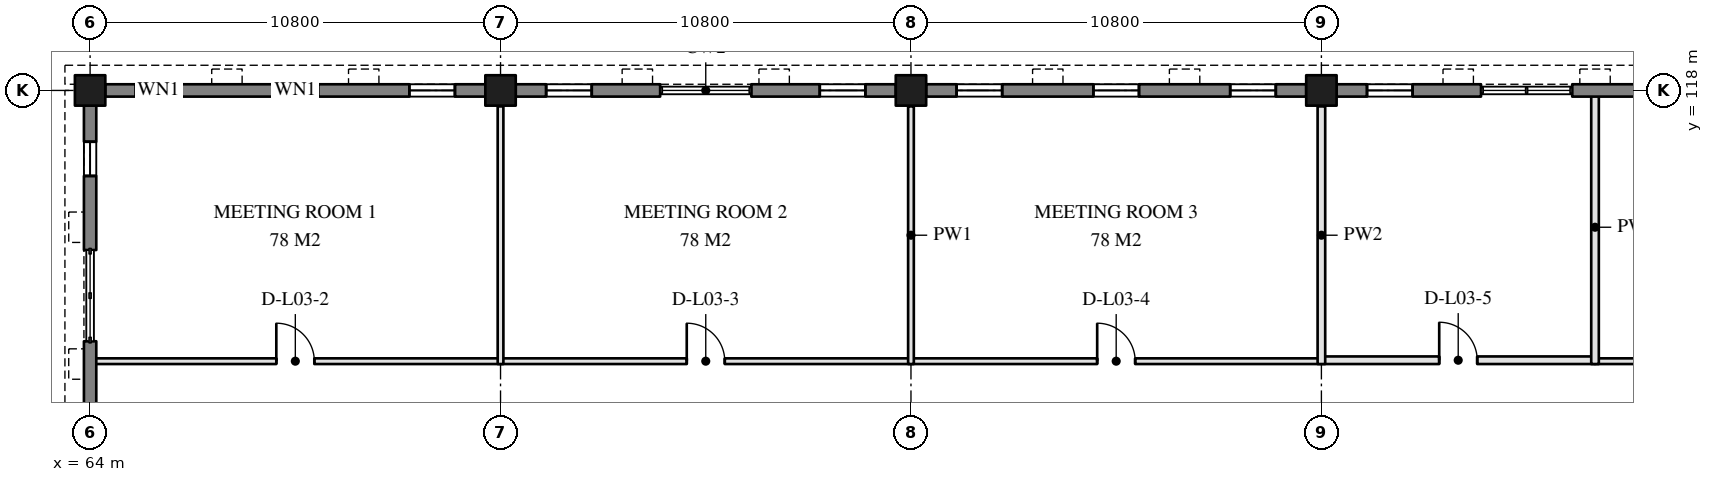
"""IFC4 building model, lengths in metres.
Left out: names, types, materials, properties, quantities, classifications, styles, units other than length and angle.
Written with IfcOpenShell. Run it as: python <this file> out.ifc"""

import sys

from ifc_helpers import new_model, si_unit, direction, frame, frame_2d, origin, origin_2d, place, context, subcontext, project, spatial, rectangle, extrude, element, fill, save


model = new_model("IFC4")
c1 = context("Model", 3, precision=1e-05, world=origin(), true_north=direction((0.0, 1.0)))
c2 = subcontext(c1, "Body", "Model", "MODEL_VIEW")
j1 = project(units=[si_unit("LENGTHUNIT", "METRE"), si_unit("PLANEANGLEUNIT", "RADIAN")], contexts=[c1])
p1 = place(None, origin())
s1 = spatial("IfcSite", under=j1, at=p1, CompositionType="ELEMENT")
p2 = place(p1, origin())
s2 = spatial("IfcBuilding", under=s1, at=p2, CompositionType="ELEMENT")
p3 = place(p2, frame((0.0, 0.0, 12.6)))
s3 = spatial("IfcBuildingStorey", under=s2, at=p3, CompositionType="ELEMENT", Elevation=12.6)
for number, where, z_axis, x_axis in (
    (1, (64.0, 118.0, 0.0), (0.0, 0.0, 1.0), (1.0, 0.0, 0.0)),
    (2, (74.8, 118.0, 0.0), (0.0, 0.0, 1.0), (1.0, 0.0, 0.0)),
    (3, (85.6, 118.0, 0.0), (0.0, 0.0, 1.0), (1.0, 0.0, 0.0)),
    (4, (96.4, 118.0, 0.0), (0.0, 0.0, 1.0), (1.0, 0.0, 0.0)),
):
    element("IfcColumn", number, at=place(p3, frame(where, z_axis=z_axis, x_axis=x_axis)), inside=s3, PredefinedType="COLUMN", context=c2, shape_type="SweptSolid", body=[
        extrude(rectangle(XDim=0.8, YDim=0.8, at=origin_2d()), origin(), (0.0, 0.0, 1.0), 3.9),
    ])
p4 = place(p3, frame((64.4, 118.0, 0.0), z_axis=(0.0, 0.0, 1.0), x_axis=(1.0, 0.0, 0.0)))
e5 = element("IfcWall", 5, at=p4, inside=s3, PredefinedType="SOLIDWALL", context=c2, shape_type="SweptSolid", body=[
    extrude(rectangle(XDim=10.0, YDim=0.325, at=frame_2d((5.0, 0.0))), origin(), (0.0, 0.0, 1.0), 2.8),
])
p5 = place(p4, frame((0.8, 0.0, 0.75)))
e6 = element("IfcOpeningElement", 6, at=p5, cuts=e5, PredefinedType="OPENING", context=c2, shape_type="SweptSolid", body=[
    extrude(rectangle(XDim=1.2, YDim=1.95, at=frame_2d((0.6, 0.975))), frame((0.0, 0.172, 0.0), z_axis=(0.0, -1.0, 0.0), x_axis=(1.0, 0.0, 0.0)), (0.0, 0.0, 1.0), 0.345),
])
p6 = place(p4, frame((4.4, 0.0, 0.75)))
e7 = element("IfcOpeningElement", 7, at=p6, cuts=e5, PredefinedType="OPENING", context=c2, shape_type="SweptSolid", body=[
    extrude(rectangle(XDim=1.2, YDim=1.95, at=frame_2d((0.6, 0.975))), frame((0.0, 0.172, 0.0), z_axis=(0.0, -1.0, 0.0), x_axis=(1.0, 0.0, 0.0)), (0.0, 0.0, 1.0), 0.345),
])
p7 = place(p4, frame((8.0, 0.0, 0.75)))
e8 = element("IfcOpeningElement", 8, at=p7, cuts=e5, PredefinedType="OPENING", context=c2, shape_type="SweptSolid", body=[
    extrude(rectangle(XDim=1.2, YDim=1.95, at=frame_2d((0.6, 0.975))), frame((0.0, 0.172, 0.0), z_axis=(0.0, -1.0, 0.0), x_axis=(1.0, 0.0, 0.0)), (0.0, 0.0, 1.0), 0.345),
])
p8 = place(p3, frame((75.2, 118.0, 0.0), z_axis=(0.0, 0.0, 1.0), x_axis=(1.0, 0.0, 0.0)))
e9 = element("IfcWall", 9, at=p8, inside=s3, PredefinedType="SOLIDWALL", context=c2, shape_type="SweptSolid", body=[
    extrude(rectangle(XDim=3.8, YDim=0.325, at=frame_2d((1.9, 0.0))), origin(), (0.0, 0.0, 1.0), 2.8),
])
p9 = place(p8, frame((0.8, 0.0, 0.75)))
e10 = element("IfcOpeningElement", 10, at=p9, cuts=e9, PredefinedType="OPENING", context=c2, shape_type="SweptSolid", body=[
    extrude(rectangle(XDim=1.2, YDim=1.95, at=frame_2d((0.6, 0.975))), frame((0.0, 0.172, 0.0), z_axis=(0.0, -1.0, 0.0), x_axis=(1.0, 0.0, 0.0)), (0.0, 0.0, 1.0), 0.345),
])
p10 = place(p3, frame((81.4, 118.0, 0.0), z_axis=(0.0, 0.0, 1.0), x_axis=(1.0, 0.0, 0.0)))
e11 = element("IfcWall", 11, at=p10, inside=s3, PredefinedType="SOLIDWALL", context=c2, shape_type="SweptSolid", body=[
    extrude(rectangle(XDim=3.8, YDim=0.325, at=frame_2d((1.9, 0.0))), origin(), (0.0, 0.0, 1.0), 2.8),
])
p11 = place(p10, frame((1.8, 0.0, 0.75)))
e12 = element("IfcOpeningElement", 12, at=p11, cuts=e11, PredefinedType="OPENING", context=c2, shape_type="SweptSolid", body=[
    extrude(rectangle(XDim=1.2, YDim=1.95, at=frame_2d((0.6, 0.975))), frame((0.0, 0.172, 0.0), z_axis=(0.0, -1.0, 0.0), x_axis=(1.0, 0.0, 0.0)), (0.0, 0.0, 1.0), 0.345),
])
p12 = place(p3, frame((86.0, 118.0, 0.0), z_axis=(0.0, 0.0, 1.0), x_axis=(1.0, 0.0, 0.0)))
e13 = element("IfcWall", 13, at=p12, inside=s3, PredefinedType="SOLIDWALL", context=c2, shape_type="SweptSolid", body=[
    extrude(rectangle(XDim=10.0, YDim=0.325, at=frame_2d((5.0, 0.0))), origin(), (0.0, 0.0, 1.0), 2.8),
])
p13 = place(p12, frame((0.8, 0.0, 0.75)))
e14 = element("IfcOpeningElement", 14, at=p13, cuts=e13, PredefinedType="OPENING", context=c2, shape_type="SweptSolid", body=[
    extrude(rectangle(XDim=1.2, YDim=1.95, at=frame_2d((0.6, 0.975))), frame((0.0, 0.172, 0.0), z_axis=(0.0, -1.0, 0.0), x_axis=(1.0, 0.0, 0.0)), (0.0, 0.0, 1.0), 0.345),
])
p14 = place(p12, frame((4.4, 0.0, 0.75)))
e15 = element("IfcOpeningElement", 15, at=p14, cuts=e13, PredefinedType="OPENING", context=c2, shape_type="SweptSolid", body=[
    extrude(rectangle(XDim=1.2, YDim=1.95, at=frame_2d((0.6, 0.975))), frame((0.0, 0.172, 0.0), z_axis=(0.0, -1.0, 0.0), x_axis=(1.0, 0.0, 0.0)), (0.0, 0.0, 1.0), 0.345),
])
p15 = place(p12, frame((8.0, 0.0, 0.75)))
e16 = element("IfcOpeningElement", 16, at=p15, cuts=e13, PredefinedType="OPENING", context=c2, shape_type="SweptSolid", body=[
    extrude(rectangle(XDim=1.2, YDim=1.95, at=frame_2d((0.6, 0.975))), frame((0.0, 0.172, 0.0), z_axis=(0.0, -1.0, 0.0), x_axis=(1.0, 0.0, 0.0)), (0.0, 0.0, 1.0), 0.345),
])
p16 = place(p3, frame((96.8, 118.0, 0.0), z_axis=(0.0, 0.0, 1.0), x_axis=(1.0, 0.0, 0.0)))
e17 = element("IfcWall", 17, at=p16, inside=s3, PredefinedType="SOLIDWALL", context=c2, shape_type="SweptSolid", body=[
    extrude(rectangle(XDim=3.8, YDim=0.325, at=frame_2d((1.9, 0.0))), origin(), (0.0, 0.0, 1.0), 2.8),
])
p17 = place(p16, frame((0.8, 0.0, 0.75)))
e18 = element("IfcOpeningElement", 18, at=p17, cuts=e17, PredefinedType="OPENING", context=c2, shape_type="SweptSolid", body=[
    extrude(rectangle(XDim=1.2, YDim=1.95, at=frame_2d((0.6, 0.975))), frame((0.0, 0.172, 0.0), z_axis=(0.0, -1.0, 0.0), x_axis=(1.0, 0.0, 0.0)), (0.0, 0.0, 1.0), 0.345),
])
p18 = place(p3, frame((103.0, 118.0, 0.0), z_axis=(0.0, 0.0, 1.0), x_axis=(1.0, 0.0, 0.0)))
e19 = element("IfcWall", 19, at=p18, inside=s3, PredefinedType="SOLIDWALL", context=c2, shape_type="SweptSolid", body=[
    extrude(rectangle(XDim=3.8, YDim=0.325, at=frame_2d((1.9, 0.0))), origin(), (0.0, 0.0, 1.0), 2.8),
])
p19 = place(p18, frame((1.8, 0.0, 0.75)))
e20 = element("IfcOpeningElement", 20, at=p19, cuts=e19, PredefinedType="OPENING", context=c2, shape_type="SweptSolid", body=[
    extrude(rectangle(XDim=1.2, YDim=1.95, at=frame_2d((0.6, 0.975))), frame((0.0, 0.172, 0.0), z_axis=(0.0, -1.0, 0.0), x_axis=(1.0, 0.0, 0.0)), (0.0, 0.0, 1.0), 0.345),
])
p20 = place(p3, frame((64.0, 107.6, 0.0), z_axis=(0.0, 0.0, 1.0), x_axis=(0.0, 1.0, 0.0)))
e21 = element("IfcWall", 21, at=p20, inside=s3, PredefinedType="SOLIDWALL", context=c2, shape_type="SweptSolid", body=[
    extrude(rectangle(XDim=3.8, YDim=0.325, at=frame_2d((1.9, 0.0))), origin(), (0.0, 0.0, 1.0), 2.8),
])
p21 = place(p20, frame((0.95, 0.0, 0.7)))
e22 = element("IfcOpeningElement", 22, at=p21, cuts=e21, PredefinedType="OPENING", context=c2, shape_type="SweptSolid", body=[
    extrude(rectangle(XDim=0.9, YDim=2.0, at=frame_2d((0.45, 1.0))), frame((0.0, 0.172, 0.0), z_axis=(0.0, -1.0, 0.0), x_axis=(1.0, 0.0, 0.0)), (0.0, 0.0, 1.0), 0.345),
])
p22 = place(p3, frame((64.0, 113.8, 0.0), z_axis=(0.0, 0.0, 1.0), x_axis=(0.0, 1.0, 0.0)))
e23 = element("IfcWall", 23, at=p22, inside=s3, PredefinedType="SOLIDWALL", context=c2, shape_type="SweptSolid", body=[
    extrude(rectangle(XDim=3.8, YDim=0.325, at=frame_2d((1.9, 0.0))), origin(), (0.0, 0.0, 1.0), 2.8),
])
p23 = place(p22, frame((1.95, 0.0, 0.7)))
e24 = element("IfcOpeningElement", 24, at=p23, cuts=e23, PredefinedType="OPENING", context=c2, shape_type="SweptSolid", body=[
    extrude(rectangle(XDim=0.9, YDim=2.0, at=frame_2d((0.45, 1.0))), frame((0.0, 0.172, 0.0), z_axis=(0.0, -1.0, 0.0), x_axis=(1.0, 0.0, 0.0)), (0.0, 0.0, 1.0), 0.345),
])
p24 = place(p3, frame((64.0, 110.875, 0.0), z_axis=(0.0, 0.0, 1.0), x_axis=(1.0, 0.0, 0.0)))
e25 = element("IfcWall", 25, at=p24, inside=s3, PredefinedType="PARTITIONING", context=c2, shape_type="SweptSolid", body=[
    extrude(rectangle(XDim=10.8, YDim=0.15, at=frame_2d((5.4, 0.0))), origin(), (0.0, 0.0, 1.0), 2.8),
])
p25 = place(p24, frame((4.9, 0.0, 0.0)))
e26 = element("IfcOpeningElement", 26, at=p25, cuts=e25, PredefinedType="OPENING", context=c2, shape_type="SweptSolid", body=[
    extrude(rectangle(XDim=1.0, YDim=2.1, at=frame_2d((0.5, 1.05))), frame((0.0, 0.085, 0.0), z_axis=(0.0, -1.0, 0.0), x_axis=(1.0, 0.0, 0.0)), (0.0, 0.0, 1.0), 0.17),
])
p26 = place(p3, frame((74.8, 110.875, 0.0), z_axis=(0.0, 0.0, 1.0), x_axis=(1.0, 0.0, 0.0)))
e27 = element("IfcWall", 27, at=p26, inside=s3, PredefinedType="PARTITIONING", context=c2, shape_type="SweptSolid", body=[
    extrude(rectangle(XDim=10.8, YDim=0.15, at=frame_2d((5.4, 0.0))), origin(), (0.0, 0.0, 1.0), 2.8),
])
p27 = place(p26, frame((4.9, 0.0, 0.0)))
e28 = element("IfcOpeningElement", 28, at=p27, cuts=e27, PredefinedType="OPENING", context=c2, shape_type="SweptSolid", body=[
    extrude(rectangle(XDim=1.0, YDim=2.1, at=frame_2d((0.5, 1.05))), frame((0.0, 0.085, 0.0), z_axis=(0.0, -1.0, 0.0), x_axis=(1.0, 0.0, 0.0)), (0.0, 0.0, 1.0), 0.17),
])
p28 = place(p3, frame((85.6, 110.875, 0.0), z_axis=(0.0, 0.0, 1.0), x_axis=(1.0, 0.0, 0.0)))
e29 = element("IfcWall", 29, at=p28, inside=s3, PredefinedType="PARTITIONING", context=c2, shape_type="SweptSolid", body=[
    extrude(rectangle(XDim=10.8, YDim=0.15, at=frame_2d((5.4, 0.0))), origin(), (0.0, 0.0, 1.0), 2.8),
])
p29 = place(p28, frame((4.9, 0.0, 0.0)))
e30 = element("IfcOpeningElement", 30, at=p29, cuts=e29, PredefinedType="OPENING", context=c2, shape_type="SweptSolid", body=[
    extrude(rectangle(XDim=1.0, YDim=2.1, at=frame_2d((0.5, 1.05))), frame((0.0, 0.085, 0.0), z_axis=(0.0, -1.0, 0.0), x_axis=(1.0, 0.0, 0.0)), (0.0, 0.0, 1.0), 0.17),
])
p30 = place(p3, frame((96.4, 110.9, 0.0), z_axis=(0.0, 0.0, 1.0), x_axis=(1.0, 0.0, 0.0)))
e31 = element("IfcWall", 31, at=p30, inside=s3, PredefinedType="PARTITIONING", context=c2, shape_type="SweptSolid", body=[
    extrude(rectangle(XDim=7.2, YDim=0.2, at=frame_2d((3.6, 0.0))), origin(), (0.0, 0.0, 1.0), 2.8),
])
p31 = place(p30, frame((3.1, 0.0, 0.0)))
e32 = element("IfcOpeningElement", 32, at=p31, cuts=e31, PredefinedType="OPENING", context=c2, shape_type="SweptSolid", body=[
    extrude(rectangle(XDim=1.0, YDim=2.1, at=frame_2d((0.5, 1.05))), frame((0.0, 0.11, 0.0), z_axis=(0.0, -1.0, 0.0), x_axis=(1.0, 0.0, 0.0)), (0.0, 0.0, 1.0), 0.22),
])
p32 = place(p3, frame((103.6, 110.875, 0.0), z_axis=(0.0, 0.0, 1.0), x_axis=(1.0, 0.0, 0.0)))
e33 = element("IfcWall", 33, at=p32, inside=s3, PredefinedType="PARTITIONING", context=c2, shape_type="SweptSolid", body=[
    extrude(rectangle(XDim=14.4, YDim=0.15, at=frame_2d((7.2, 0.0))), origin(), (0.0, 0.0, 1.0), 2.8),
])
p33 = place(p32, frame((6.3, 0.0, 0.0)))
e34 = element("IfcOpeningElement", 34, at=p33, cuts=e33, PredefinedType="OPENING", context=c2, shape_type="SweptSolid", body=[
    extrude(rectangle(XDim=1.8, YDim=2.1, at=frame_2d((0.9, 1.05))), frame((0.0, 0.085, 0.0), z_axis=(0.0, -1.0, 0.0), x_axis=(1.0, 0.0, 0.0)), (0.0, 0.0, 1.0), 0.17),
])
for number, where, z_axis, x_axis in (
    (35, (74.8, 110.8, 0.0), (0.0, 0.0, 1.0), (0.0, 1.0, 0.0)),
    (36, (85.6, 110.8, 0.0), (0.0, 0.0, 1.0), (0.0, 1.0, 0.0)),
):
    element("IfcWall", number, at=place(p3, frame(where, z_axis=z_axis, x_axis=x_axis)), inside=s3, PredefinedType="PARTITIONING", context=c2, shape_type="SweptSolid", body=[
        extrude(rectangle(XDim=6.78, YDim=0.15, at=frame_2d((3.39, 0.0))), origin(), (0.0, 0.0, 1.0), 2.8),
    ])
p34 = place(p3, frame((96.4, 110.8, 0.0), z_axis=(0.0, 0.0, 1.0), x_axis=(0.0, 1.0, 0.0)))
e37 = element("IfcWall", 37, at=p34, inside=s3, PredefinedType="PARTITIONING", context=c2, shape_type="SweptSolid", body=[
    extrude(rectangle(XDim=6.78, YDim=0.2, at=frame_2d((3.39, 0.0))), origin(), (0.0, 0.0, 1.0), 2.8),
])
p35 = place(p3, frame((103.6, 110.8, 0.0), z_axis=(0.0, 0.0, 1.0), x_axis=(0.0, 1.0, 0.0)))
e38 = element("IfcWall", 38, at=p35, inside=s3, PredefinedType="PARTITIONING", context=c2, shape_type="SweptSolid", body=[
    extrude(rectangle(XDim=7.2, YDim=0.2, at=frame_2d((3.6, 0.0))), origin(), (0.0, 0.0, 1.0), 2.8),
])
p36 = place(p5, origin())
e39 = element("IfcWindow", 39, at=p36, inside=s3, PartitioningType="SINGLE_PANEL", PredefinedType="WINDOW", context=c2, shape_type="SweptSolid", body=[
    extrude(rectangle(XDim=1.2, YDim=1.95, at=frame_2d((0.6, 0.975))), frame((0.0, 0.03, 0.0), z_axis=(0.0, -1.0, 0.0), x_axis=(1.0, 0.0, 0.0)), (0.0, 0.0, 1.0), 0.06),
])
fill(e6, e39)
p37 = place(p6, origin())
e40 = element("IfcWindow", 40, at=p37, inside=s3, PartitioningType="SINGLE_PANEL", PredefinedType="WINDOW", context=c2, shape_type="SweptSolid", body=[
    extrude(rectangle(XDim=1.2, YDim=1.95, at=frame_2d((0.6, 0.975))), frame((0.0, 0.03, 0.0), z_axis=(0.0, -1.0, 0.0), x_axis=(1.0, 0.0, 0.0)), (0.0, 0.0, 1.0), 0.06),
])
fill(e7, e40)
p38 = place(p7, origin())
e41 = element("IfcWindow", 41, at=p38, inside=s3, PartitioningType="SINGLE_PANEL", PredefinedType="WINDOW", context=c2, shape_type="SweptSolid", body=[
    extrude(rectangle(XDim=1.2, YDim=1.95, at=frame_2d((0.6, 0.975))), frame((0.0, 0.03, 0.0), z_axis=(0.0, -1.0, 0.0), x_axis=(1.0, 0.0, 0.0)), (0.0, 0.0, 1.0), 0.06),
])
fill(e8, e41)
p39 = place(p9, origin())
e42 = element("IfcWindow", 42, at=p39, inside=s3, PartitioningType="SINGLE_PANEL", PredefinedType="WINDOW", context=c2, shape_type="SweptSolid", body=[
    extrude(rectangle(XDim=1.2, YDim=1.95, at=frame_2d((0.6, 0.975))), frame((0.0, 0.03, 0.0), z_axis=(0.0, -1.0, 0.0), x_axis=(1.0, 0.0, 0.0)), (0.0, 0.0, 1.0), 0.06),
])
fill(e10, e42)
p40 = place(p11, origin())
e43 = element("IfcWindow", 43, at=p40, inside=s3, PartitioningType="SINGLE_PANEL", PredefinedType="WINDOW", context=c2, shape_type="SweptSolid", body=[
    extrude(rectangle(XDim=1.2, YDim=1.95, at=frame_2d((0.6, 0.975))), frame((0.0, 0.03, 0.0), z_axis=(0.0, -1.0, 0.0), x_axis=(1.0, 0.0, 0.0)), (0.0, 0.0, 1.0), 0.06),
])
fill(e12, e43)
p41 = place(p13, origin())
e44 = element("IfcWindow", 44, at=p41, inside=s3, PartitioningType="SINGLE_PANEL", PredefinedType="WINDOW", context=c2, shape_type="SweptSolid", body=[
    extrude(rectangle(XDim=1.2, YDim=1.95, at=frame_2d((0.6, 0.975))), frame((0.0, 0.03, 0.0), z_axis=(0.0, -1.0, 0.0), x_axis=(1.0, 0.0, 0.0)), (0.0, 0.0, 1.0), 0.06),
])
fill(e14, e44)
p42 = place(p14, origin())
e45 = element("IfcWindow", 45, at=p42, inside=s3, PartitioningType="SINGLE_PANEL", PredefinedType="WINDOW", context=c2, shape_type="SweptSolid", body=[
    extrude(rectangle(XDim=1.2, YDim=1.95, at=frame_2d((0.6, 0.975))), frame((0.0, 0.03, 0.0), z_axis=(0.0, -1.0, 0.0), x_axis=(1.0, 0.0, 0.0)), (0.0, 0.0, 1.0), 0.06),
])
fill(e15, e45)
p43 = place(p15, origin())
e46 = element("IfcWindow", 46, at=p43, inside=s3, PartitioningType="SINGLE_PANEL", PredefinedType="WINDOW", context=c2, shape_type="SweptSolid", body=[
    extrude(rectangle(XDim=1.2, YDim=1.95, at=frame_2d((0.6, 0.975))), frame((0.0, 0.03, 0.0), z_axis=(0.0, -1.0, 0.0), x_axis=(1.0, 0.0, 0.0)), (0.0, 0.0, 1.0), 0.06),
])
fill(e16, e46)
p44 = place(p17, origin())
e47 = element("IfcWindow", 47, at=p44, inside=s3, PartitioningType="SINGLE_PANEL", PredefinedType="WINDOW", context=c2, shape_type="SweptSolid", body=[
    extrude(rectangle(XDim=1.2, YDim=1.95, at=frame_2d((0.6, 0.975))), frame((0.0, 0.03, 0.0), z_axis=(0.0, -1.0, 0.0), x_axis=(1.0, 0.0, 0.0)), (0.0, 0.0, 1.0), 0.06),
])
fill(e18, e47)
p45 = place(p23, origin())
e48 = element("IfcWindow", 48, at=p45, inside=s3, PartitioningType="SINGLE_PANEL", PredefinedType="WINDOW", context=c2, shape_type="SweptSolid", body=[
    extrude(rectangle(XDim=0.9, YDim=2.0, at=frame_2d((0.45, 1.0))), frame((0.0, 0.03, 0.0), z_axis=(0.0, -1.0, 0.0), x_axis=(1.0, 0.0, 0.0)), (0.0, 0.0, 1.0), 0.06),
])
fill(e24, e48)
p46 = place(p25, frame((1.0, 0.0, 0.0), z_axis=(0.0, 0.0, 1.0), x_axis=(-1.0, 0.0, 0.0)))
e49 = element("IfcDoor", 49, at=p46, inside=s3, OperationType="SINGLE_SWING_LEFT", PredefinedType="DOOR", context=c2, shape_type="SweptSolid", body=[
    extrude(rectangle(XDim=1.0, YDim=2.1, at=frame_2d((0.5, 1.05))), frame((0.0, 0.025, 0.0), z_axis=(0.0, -1.0, 0.0), x_axis=(1.0, 0.0, 0.0)), (0.0, 0.0, 1.0), 0.05),
])
fill(e26, e49)
p47 = place(p27, frame((1.0, 0.0, 0.0), z_axis=(0.0, 0.0, 1.0), x_axis=(-1.0, 0.0, 0.0)))
e50 = element("IfcDoor", 50, at=p47, inside=s3, OperationType="SINGLE_SWING_RIGHT", PredefinedType="DOOR", context=c2, shape_type="SweptSolid", body=[
    extrude(rectangle(XDim=1.0, YDim=2.1, at=frame_2d((0.5, 1.05))), frame((0.0, 0.025, 0.0), z_axis=(0.0, -1.0, 0.0), x_axis=(1.0, 0.0, 0.0)), (0.0, 0.0, 1.0), 0.05),
])
fill(e28, e50)
p48 = place(p29, frame((1.0, 0.0, 0.0), z_axis=(0.0, 0.0, 1.0), x_axis=(-1.0, 0.0, 0.0)))
e51 = element("IfcDoor", 51, at=p48, inside=s3, OperationType="SINGLE_SWING_RIGHT", PredefinedType="DOOR", context=c2, shape_type="SweptSolid", body=[
    extrude(rectangle(XDim=1.0, YDim=2.1, at=frame_2d((0.5, 1.05))), frame((0.0, 0.025, 0.0), z_axis=(0.0, -1.0, 0.0), x_axis=(1.0, 0.0, 0.0)), (0.0, 0.0, 1.0), 0.05),
])
fill(e30, e51)
p49 = place(p31, origin())
e52 = element("IfcDoor", 52, at=p49, inside=s3, OperationType="SINGLE_SWING_LEFT", PredefinedType="DOOR", context=c2, shape_type="SweptSolid", body=[
    extrude(rectangle(XDim=1.0, YDim=2.1, at=frame_2d((0.5, 1.05))), frame((0.0, 0.025, 0.0), z_axis=(0.0, -1.0, 0.0), x_axis=(1.0, 0.0, 0.0)), (0.0, 0.0, 1.0), 0.05),
])
fill(e32, e52)
save(model, sys.argv[1])
